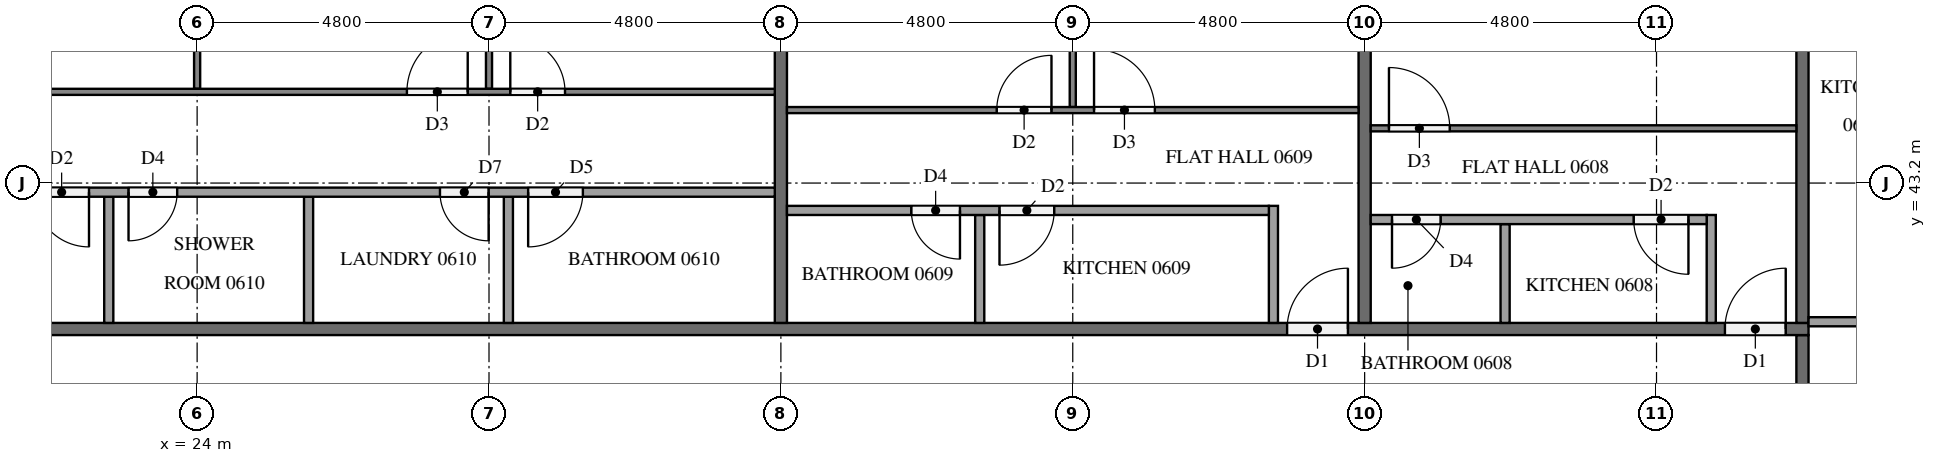
"""IFC4 building model, lengths in metres.
Left out: names, types, materials, properties, quantities, classifications, styles, units other than length and angle.
Written with IfcOpenShell. Run it as: python <this file> out.ifc"""

import sys

from ifc_helpers import new_model, si_unit, direction, frame, frame_2d, origin, place, context, subcontext, project, spatial, rectangle, extrude, element, fill, save


model = new_model("IFC4")
c1 = context("Model", 3, precision=1e-05, world=origin(), true_north=direction((0.0, 1.0)))
c2 = subcontext(c1, "Body", "Model", "MODEL_VIEW")
j1 = project(units=[si_unit("LENGTHUNIT", "METRE"), si_unit("PLANEANGLEUNIT", "RADIAN")], contexts=[c1])
p1 = place(None, origin())
s1 = spatial("IfcSite", under=j1, at=p1, CompositionType="ELEMENT")
p2 = place(p1, origin())
s2 = spatial("IfcBuilding", under=s1, at=p2, CompositionType="ELEMENT")
p3 = place(p2, frame((0.0, 0.0, 29.4)))
s3 = spatial("IfcBuildingStorey", under=s2, at=p3, CompositionType="ELEMENT", Elevation=29.4)
p4 = place(p3, frame((50.4, 40.7, 0.0), z_axis=(0.0, 0.0, 1.0), x_axis=(0.0, -1.0, 0.0)))
e1 = element("IfcWall", 1, at=p4, inside=s3, PredefinedType="PARTITIONING", context=c2, shape_type="SweptSolid", body=[
    extrude(rectangle(XDim=28.6, YDim=0.2, at=frame_2d((14.3, 0.0))), origin(), (0.0, 0.0, 1.0), 3.2),
])
p5 = place(p4, frame((27.375, 0.0, 0.0)))
e2 = element("IfcOpeningElement", 2, at=p5, cuts=e1, PredefinedType="OPENING", context=c2, shape_type="SweptSolid", body=[
    extrude(rectangle(XDim=1.1, YDim=2.1, at=frame_2d((0.55, 1.05))), frame((0.0, 0.11, 0.0), z_axis=(0.0, -1.0, 0.0), x_axis=(1.0, 0.0, 0.0)), (0.0, 0.0, 1.0), 0.22),
])
p6 = place(p4, frame((8.225, 0.0, 0.0)))
e3 = element("IfcOpeningElement", 3, at=p6, cuts=e1, PredefinedType="OPENING", context=c2, shape_type="SweptSolid", body=[
    extrude(rectangle(XDim=1.0, YDim=2.1, at=frame_2d((0.5, 1.05))), frame((0.0, 0.11, 0.0), z_axis=(0.0, -1.0, 0.0), x_axis=(1.0, 0.0, 0.0)), (0.0, 0.0, 1.0), 0.22),
])
p7 = place(p3, frame((11.9, 40.8, 0.0), z_axis=(0.0, 0.0, 1.0), x_axis=(1.0, 0.0, 0.0)))
e4 = element("IfcWall", 4, at=p7, inside=s3, PredefinedType="PARTITIONING", context=c2, shape_type="SweptSolid", body=[
    extrude(rectangle(XDim=38.6, YDim=0.2, at=frame_2d((19.3, 0.0))), origin(), (0.0, 0.0, 1.0), 3.2),
])
p8 = place(p7, frame((37.225, 0.0, 0.0)))
e5 = element("IfcOpeningElement", 5, at=p8, cuts=e4, PredefinedType="OPENING", context=c2, shape_type="SweptSolid", body=[
    extrude(rectangle(XDim=1.0, YDim=2.1, at=frame_2d((0.5, 1.05))), frame((0.0, 0.11, 0.0), z_axis=(0.0, -1.0, 0.0), x_axis=(1.0, 0.0, 0.0)), (0.0, 0.0, 1.0), 0.22),
])
p9 = place(p7, frame((30.025, 0.0, 0.0)))
e6 = element("IfcOpeningElement", 6, at=p9, cuts=e4, PredefinedType="OPENING", context=c2, shape_type="SweptSolid", body=[
    extrude(rectangle(XDim=1.0, YDim=2.1, at=frame_2d((0.5, 1.05))), frame((0.0, 0.11, 0.0), z_axis=(0.0, -1.0, 0.0), x_axis=(1.0, 0.0, 0.0)), (0.0, 0.0, 1.0), 0.22),
])
p10 = place(p7, frame((2.725, 0.0, 0.0)))
e7 = element("IfcOpeningElement", 7, at=p10, cuts=e4, PredefinedType="OPENING", context=c2, shape_type="SweptSolid", body=[
    extrude(rectangle(XDim=1.1, YDim=2.1, at=frame_2d((0.55, 1.05))), frame((0.0, 0.11, 0.0), z_axis=(0.0, -1.0, 0.0), x_axis=(1.0, 0.0, 0.0)), (0.0, 0.0, 1.0), 0.22),
])
p11 = place(p7, frame((1.225, 0.0, 0.0)))
e8 = element("IfcOpeningElement", 8, at=p11, cuts=e4, PredefinedType="OPENING", context=c2, shape_type="SweptSolid", body=[
    extrude(rectangle(XDim=1.0, YDim=2.1, at=frame_2d((0.5, 1.05))), frame((0.0, 0.11, 0.0), z_axis=(0.0, -1.0, 0.0), x_axis=(1.0, 0.0, 0.0)), (0.0, 0.0, 1.0), 0.22),
])
p12 = place(p3, frame((50.4, 40.9, 0.0), z_axis=(0.0, 0.0, 1.0), x_axis=(0.0, 1.0, 0.0)))
e9 = element("IfcWall", 9, at=p12, inside=s3, PredefinedType="PARTITIONING", context=c2, shape_type="SweptSolid", body=[
    extrude(rectangle(XDim=7.0, YDim=0.2, at=frame_2d((3.5, 0.0))), origin(), (0.0, 0.0, 1.0), 3.2),
])
for number, where, z_axis, x_axis in (
    (10, (43.2, 47.55, 0.0), (0.0, 0.0, 1.0), (0.0, -1.0, 0.0)),
    (11, (33.6, 47.55, 0.0), (0.0, 0.0, 1.0), (0.0, -1.0, 0.0)),
):
    element("IfcWall", number, at=place(p3, frame(where, z_axis=z_axis, x_axis=x_axis)), inside=s3, PredefinedType="PARTITIONING", context=c2, shape_type="SweptSolid", body=[
        extrude(rectangle(XDim=6.65, YDim=0.2, at=frame_2d((3.325, 0.0))), origin(), (0.0, 0.0, 1.0), 3.2),
    ])
p13 = place(p3, frame((50.5, 40.919, 0.0), z_axis=(0.0, 0.0, 1.0), x_axis=(1.0, 0.0, 0.0)))
e12 = element("IfcWall", 12, at=p13, inside=s3, PredefinedType="PARTITIONING", context=c2, shape_type="SweptSolid", body=[
    extrude(rectangle(XDim=1.775, YDim=0.15, at=frame_2d((0.887, 0.0))), origin(), (0.0, 0.0, 1.0), 3.2),
])
p14 = place(p3, frame((43.3, 44.1, 0.0), z_axis=(0.0, 0.0, 1.0), x_axis=(1.0, 0.0, 0.0)))
e13 = element("IfcWall", 13, at=p14, inside=s3, PredefinedType="PARTITIONING", context=c2, shape_type="SweptSolid", body=[
    extrude(rectangle(XDim=7.0, YDim=0.1, at=frame_2d((3.5, 0.0))), origin(), (0.0, 0.0, 1.0), 3.2),
])
p15 = place(p14, frame((0.3, 0.0, 0.0)))
e14 = element("IfcOpeningElement", 14, at=p15, cuts=e13, PredefinedType="OPENING", context=c2, shape_type="SweptSolid", body=[
    extrude(rectangle(XDim=1.0, YDim=2.1, at=frame_2d((0.5, 1.05))), frame((0.0, 0.06, 0.0), z_axis=(0.0, -1.0, 0.0), x_axis=(1.0, 0.0, 0.0)), (0.0, 0.0, 1.0), 0.12),
])
p16 = place(p3, frame((45.51, 40.9, 0.0), z_axis=(0.0, 0.0, 1.0), x_axis=(0.0, 1.0, 0.0)))
e15 = element("IfcWall", 15, at=p16, inside=s3, PredefinedType="PARTITIONING", context=c2, shape_type="SweptSolid", body=[
    extrude(rectangle(XDim=1.625, YDim=0.15, at=frame_2d((0.812, 0.0))), origin(), (0.0, 0.0, 1.0), 3.2),
])
p17 = place(p3, frame((48.9, 40.9, 0.0), z_axis=(0.0, 0.0, 1.0), x_axis=(0.0, 1.0, 0.0)))
e16 = element("IfcWall", 16, at=p17, inside=s3, PredefinedType="PARTITIONING", context=c2, shape_type="SweptSolid", body=[
    extrude(rectangle(XDim=1.775, YDim=0.15, at=frame_2d((0.888, 0.0))), origin(), (0.0, 0.0, 1.0), 3.2),
])
p18 = place(p3, frame((48.825, 42.6, 0.0), z_axis=(0.0, 0.0, 1.0), x_axis=(-1.0, 0.0, 0.0)))
e17 = element("IfcWall", 17, at=p18, inside=s3, PredefinedType="PARTITIONING", context=c2, shape_type="SweptSolid", body=[
    extrude(rectangle(XDim=5.525, YDim=0.15, at=frame_2d((2.762, 0.0))), origin(), (0.0, 0.0, 1.0), 3.2),
])
p19 = place(p18, frame((0.3, 0.0, 0.0)))
e18 = element("IfcOpeningElement", 18, at=p19, cuts=e17, PredefinedType="OPENING", context=c2, shape_type="SweptSolid", body=[
    extrude(rectangle(XDim=0.9, YDim=2.1, at=frame_2d((0.45, 1.05))), frame((0.0, 0.085, 0.0), z_axis=(0.0, -1.0, 0.0), x_axis=(1.0, 0.0, 0.0)), (0.0, 0.0, 1.0), 0.17),
])
p20 = place(p18, frame((4.375, 0.0, 0.0)))
e19 = element("IfcOpeningElement", 19, at=p20, cuts=e17, PredefinedType="OPENING", context=c2, shape_type="SweptSolid", body=[
    extrude(rectangle(XDim=0.8, YDim=2.1, at=frame_2d((0.4, 1.05))), frame((0.0, 0.085, 0.0), z_axis=(0.0, -1.0, 0.0), x_axis=(1.0, 0.0, 0.0)), (0.0, 0.0, 1.0), 0.17),
])
p21 = place(p3, frame((38.4, 44.45, 0.0), z_axis=(0.0, 0.0, 1.0), x_axis=(0.0, 1.0, 0.0)))
e20 = element("IfcWall", 20, at=p21, inside=s3, PredefinedType="PARTITIONING", context=c2, shape_type="SweptSolid", body=[
    extrude(rectangle(XDim=3.45, YDim=0.1, at=frame_2d((1.725, 0.0))), origin(), (0.0, 0.0, 1.0), 3.2),
])
p22 = place(p3, frame((33.7, 44.4, 0.0), z_axis=(0.0, 0.0, 1.0), x_axis=(1.0, 0.0, 0.0)))
e21 = element("IfcWall", 21, at=p22, inside=s3, PredefinedType="PARTITIONING", context=c2, shape_type="SweptSolid", body=[
    extrude(rectangle(XDim=9.4, YDim=0.1, at=frame_2d((4.7, 0.0))), origin(), (0.0, 0.0, 1.0), 3.2),
])
p23 = place(p22, frame((5.05, 0.0, 0.0)))
e22 = element("IfcOpeningElement", 22, at=p23, cuts=e21, PredefinedType="OPENING", context=c2, shape_type="SweptSolid", body=[
    extrude(rectangle(XDim=1.0, YDim=2.1, at=frame_2d((0.5, 1.05))), frame((0.0, 0.06, 0.0), z_axis=(0.0, -1.0, 0.0), x_axis=(1.0, 0.0, 0.0)), (0.0, 0.0, 1.0), 0.12),
])
p24 = place(p22, frame((3.45, 0.0, 0.0)))
e23 = element("IfcOpeningElement", 23, at=p24, cuts=e21, PredefinedType="OPENING", context=c2, shape_type="SweptSolid", body=[
    extrude(rectangle(XDim=0.9, YDim=2.1, at=frame_2d((0.45, 1.05))), frame((0.0, 0.06, 0.0), z_axis=(0.0, -1.0, 0.0), x_axis=(1.0, 0.0, 0.0)), (0.0, 0.0, 1.0), 0.12),
])
p25 = place(p3, frame((36.87, 40.9, 0.0), z_axis=(0.0, 0.0, 1.0), x_axis=(0.0, 1.0, 0.0)))
e24 = element("IfcWall", 24, at=p25, inside=s3, PredefinedType="PARTITIONING", context=c2, shape_type="SweptSolid", body=[
    extrude(rectangle(XDim=1.775, YDim=0.15, at=frame_2d((0.888, 0.0))), origin(), (0.0, 0.0, 1.0), 3.2),
])
p26 = place(p3, frame((41.7, 40.9, 0.0), z_axis=(0.0, 0.0, 1.0), x_axis=(0.0, 1.0, 0.0)))
e25 = element("IfcWall", 25, at=p26, inside=s3, PredefinedType="PARTITIONING", context=c2, shape_type="SweptSolid", body=[
    extrude(rectangle(XDim=1.925, YDim=0.15, at=frame_2d((0.962, 0.0))), origin(), (0.0, 0.0, 1.0), 3.2),
])
p27 = place(p3, frame((41.625, 42.75, 0.0), z_axis=(0.0, 0.0, 1.0), x_axis=(-1.0, 0.0, 0.0)))
e26 = element("IfcWall", 26, at=p27, inside=s3, PredefinedType="PARTITIONING", context=c2, shape_type="SweptSolid", body=[
    extrude(rectangle(XDim=7.925, YDim=0.15, at=frame_2d((3.962, 0.0))), origin(), (0.0, 0.0, 1.0), 3.2),
])
p28 = place(p27, frame((3.53, 0.0, 0.0)))
e27 = element("IfcOpeningElement", 27, at=p28, cuts=e26, PredefinedType="OPENING", context=c2, shape_type="SweptSolid", body=[
    extrude(rectangle(XDim=0.9, YDim=2.1, at=frame_2d((0.45, 1.05))), frame((0.0, 0.085, 0.0), z_axis=(0.0, -1.0, 0.0), x_axis=(1.0, 0.0, 0.0)), (0.0, 0.0, 1.0), 0.17),
])
p29 = place(p27, frame((5.08, 0.0, 0.0)))
e28 = element("IfcOpeningElement", 28, at=p29, cuts=e26, PredefinedType="OPENING", context=c2, shape_type="SweptSolid", body=[
    extrude(rectangle(XDim=0.8, YDim=2.1, at=frame_2d((0.4, 1.05))), frame((0.0, 0.085, 0.0), z_axis=(0.0, -1.0, 0.0), x_axis=(1.0, 0.0, 0.0)), (0.0, 0.0, 1.0), 0.17),
])
p30 = place(p3, frame((24.0, 44.75, 0.0), z_axis=(0.0, 0.0, 1.0), x_axis=(0.0, 1.0, 0.0)))
e29 = element("IfcWall", 29, at=p30, inside=s3, PredefinedType="PARTITIONING", context=c2, shape_type="SweptSolid", body=[
    extrude(rectangle(XDim=2.8, YDim=0.1, at=frame_2d((1.4, 0.0))), origin(), (0.0, 0.0, 1.0), 3.2),
])
p31 = place(p3, frame((28.8, 44.75, 0.0), z_axis=(0.0, 0.0, 1.0), x_axis=(0.0, 1.0, 0.0)))
e30 = element("IfcWall", 30, at=p31, inside=s3, PredefinedType="PARTITIONING", context=c2, shape_type="SweptSolid", body=[
    extrude(rectangle(XDim=3.15, YDim=0.1, at=frame_2d((1.575, 0.0))), origin(), (0.0, 0.0, 1.0), 3.2),
])
p32 = place(p3, frame((14.5, 44.7, 0.0), z_axis=(0.0, 0.0, 1.0), x_axis=(1.0, 0.0, 0.0)))
e31 = element("IfcWall", 31, at=p32, inside=s3, PredefinedType="PARTITIONING", context=c2, shape_type="SweptSolid", body=[
    extrude(rectangle(XDim=19.0, YDim=0.1, at=frame_2d((9.5, 0.0))), origin(), (0.0, 0.0, 1.0), 3.2),
])
p33 = place(p32, frame((3.45, 0.0, 0.0)))
e32 = element("IfcOpeningElement", 32, at=p33, cuts=e31, PredefinedType="OPENING", context=c2, shape_type="SweptSolid", body=[
    extrude(rectangle(XDim=0.9, YDim=2.1, at=frame_2d((0.45, 1.05))), frame((0.0, 0.06, 0.0), z_axis=(0.0, -1.0, 0.0), x_axis=(1.0, 0.0, 0.0)), (0.0, 0.0, 1.0), 0.12),
])
p34 = place(p32, frame((5.05, 0.0, 0.0)))
e33 = element("IfcOpeningElement", 33, at=p34, cuts=e31, PredefinedType="OPENING", context=c2, shape_type="SweptSolid", body=[
    extrude(rectangle(XDim=0.9, YDim=2.1, at=frame_2d((0.45, 1.05))), frame((0.0, 0.06, 0.0), z_axis=(0.0, -1.0, 0.0), x_axis=(1.0, 0.0, 0.0)), (0.0, 0.0, 1.0), 0.12),
])
p35 = place(p32, frame((12.95, 0.0, 0.0)))
e34 = element("IfcOpeningElement", 34, at=p35, cuts=e31, PredefinedType="OPENING", context=c2, shape_type="SweptSolid", body=[
    extrude(rectangle(XDim=1.0, YDim=2.1, at=frame_2d((0.5, 1.05))), frame((0.0, 0.06, 0.0), z_axis=(0.0, -1.0, 0.0), x_axis=(1.0, 0.0, 0.0)), (0.0, 0.0, 1.0), 0.12),
])
p36 = place(p32, frame((14.65, 0.0, 0.0)))
e35 = element("IfcOpeningElement", 35, at=p36, cuts=e31, PredefinedType="OPENING", context=c2, shape_type="SweptSolid", body=[
    extrude(rectangle(XDim=0.9, YDim=2.1, at=frame_2d((0.45, 1.05))), frame((0.0, 0.06, 0.0), z_axis=(0.0, -1.0, 0.0), x_axis=(1.0, 0.0, 0.0)), (0.0, 0.0, 1.0), 0.12),
])
for number, where, z_axis, x_axis in (
    (36, (22.547, 40.9, 0.0), (0.0, 0.0, 1.0), (0.0, 1.0, 0.0)),
    (37, (25.833, 40.9, 0.0), (0.0, 0.0, 1.0), (0.0, 1.0, 0.0)),
    (38, (29.119, 40.9, 0.0), (0.0, 0.0, 1.0), (0.0, 1.0, 0.0)),
):
    element("IfcWall", number, at=place(p3, frame(where, z_axis=z_axis, x_axis=x_axis)), inside=s3, PredefinedType="PARTITIONING", context=c2, shape_type="SweptSolid", body=[
        extrude(rectangle(XDim=2.075, YDim=0.15, at=frame_2d((1.038, 0.0))), origin(), (0.0, 0.0, 1.0), 3.2),
    ])
p37 = place(p3, frame((33.5, 43.05, 0.0), z_axis=(0.0, 0.0, 1.0), x_axis=(-1.0, 0.0, 0.0)))
e39 = element("IfcWall", 39, at=p37, inside=s3, PredefinedType="PARTITIONING", context=c2, shape_type="SweptSolid", body=[
    extrude(rectangle(XDim=17.525, YDim=0.15, at=frame_2d((8.762, 0.0))), origin(), (0.0, 0.0, 1.0), 3.2),
])
p38 = place(p37, frame((11.278, 0.0, 0.0)))
e40 = element("IfcOpeningElement", 40, at=p38, cuts=e39, PredefinedType="OPENING", context=c2, shape_type="SweptSolid", body=[
    extrude(rectangle(XDim=0.9, YDim=2.1, at=frame_2d((0.45, 1.05))), frame((0.0, 0.085, 0.0), z_axis=(0.0, -1.0, 0.0), x_axis=(1.0, 0.0, 0.0)), (0.0, 0.0, 1.0), 0.17),
])
p39 = place(p37, frame((9.828, 0.0, 0.0)))
e41 = element("IfcOpeningElement", 41, at=p39, cuts=e39, PredefinedType="OPENING", context=c2, shape_type="SweptSolid", body=[
    extrude(rectangle(XDim=0.8, YDim=2.1, at=frame_2d((0.4, 1.05))), frame((0.0, 0.085, 0.0), z_axis=(0.0, -1.0, 0.0), x_axis=(1.0, 0.0, 0.0)), (0.0, 0.0, 1.0), 0.17),
])
p40 = place(p37, frame((4.706, 0.0, 0.0)))
e42 = element("IfcOpeningElement", 42, at=p40, cuts=e39, PredefinedType="OPENING", context=c2, shape_type="SweptSolid", body=[
    extrude(rectangle(XDim=0.8, YDim=2.1, at=frame_2d((0.4, 1.05))), frame((0.0, 0.085, 0.0), z_axis=(0.0, -1.0, 0.0), x_axis=(1.0, 0.0, 0.0)), (0.0, 0.0, 1.0), 0.17),
])
p41 = place(p37, frame((3.156, 0.0, 0.0)))
e43 = element("IfcOpeningElement", 43, at=p41, cuts=e39, PredefinedType="OPENING", context=c2, shape_type="SweptSolid", body=[
    extrude(rectangle(XDim=0.9, YDim=2.1, at=frame_2d((0.45, 1.05))), frame((0.0, 0.085, 0.0), z_axis=(0.0, -1.0, 0.0), x_axis=(1.0, 0.0, 0.0)), (0.0, 0.0, 1.0), 0.17),
])
p42 = place(p8, origin())
e44 = element("IfcDoor", 44, at=p42, inside=s3, OperationType="SINGLE_SWING_RIGHT", PredefinedType="DOOR", context=c2, shape_type="SweptSolid", body=[
    extrude(rectangle(XDim=1.0, YDim=2.1, at=frame_2d((0.5, 1.05))), frame((0.0, 0.025, 0.0), z_axis=(0.0, -1.0, 0.0), x_axis=(1.0, 0.0, 0.0)), (0.0, 0.0, 1.0), 0.05),
])
fill(e5, e44)
p43 = place(p9, origin())
e45 = element("IfcDoor", 45, at=p43, inside=s3, OperationType="SINGLE_SWING_RIGHT", PredefinedType="DOOR", context=c2, shape_type="SweptSolid", body=[
    extrude(rectangle(XDim=1.0, YDim=2.1, at=frame_2d((0.5, 1.05))), frame((0.0, 0.025, 0.0), z_axis=(0.0, -1.0, 0.0), x_axis=(1.0, 0.0, 0.0)), (0.0, 0.0, 1.0), 0.05),
])
fill(e6, e45)
p44 = place(p15, origin())
e46 = element("IfcDoor", 46, at=p44, inside=s3, OperationType="SINGLE_SWING_LEFT", PredefinedType="DOOR", context=c2, shape_type="SweptSolid", body=[
    extrude(rectangle(XDim=1.0, YDim=2.1, at=frame_2d((0.5, 1.05))), frame((0.0, 0.025, 0.0), z_axis=(0.0, -1.0, 0.0), x_axis=(1.0, 0.0, 0.0)), (0.0, 0.0, 1.0), 0.05),
])
fill(e14, e46)
p45 = place(p19, origin())
e47 = element("IfcDoor", 47, at=p45, inside=s3, OperationType="SINGLE_SWING_LEFT", PredefinedType="DOOR", context=c2, shape_type="SweptSolid", body=[
    extrude(rectangle(XDim=0.9, YDim=2.1, at=frame_2d((0.45, 1.05))), frame((0.0, 0.025, 0.0), z_axis=(0.0, -1.0, 0.0), x_axis=(1.0, 0.0, 0.0)), (0.0, 0.0, 1.0), 0.05),
])
fill(e18, e47)
p46 = place(p20, origin())
e48 = element("IfcDoor", 48, at=p46, inside=s3, OperationType="SINGLE_SWING_RIGHT", PredefinedType="DOOR", context=c2, shape_type="SweptSolid", body=[
    extrude(rectangle(XDim=0.8, YDim=2.1, at=frame_2d((0.4, 1.05))), frame((0.0, 0.025, 0.0), z_axis=(0.0, -1.0, 0.0), x_axis=(1.0, 0.0, 0.0)), (0.0, 0.0, 1.0), 0.05),
])
fill(e19, e48)
p47 = place(p23, origin())
e49 = element("IfcDoor", 49, at=p47, inside=s3, OperationType="SINGLE_SWING_LEFT", PredefinedType="DOOR", context=c2, shape_type="SweptSolid", body=[
    extrude(rectangle(XDim=1.0, YDim=2.1, at=frame_2d((0.5, 1.05))), frame((0.0, 0.025, 0.0), z_axis=(0.0, -1.0, 0.0), x_axis=(1.0, 0.0, 0.0)), (0.0, 0.0, 1.0), 0.05),
])
fill(e22, e49)
p48 = place(p24, origin())
e50 = element("IfcDoor", 50, at=p48, inside=s3, OperationType="SINGLE_SWING_RIGHT", PredefinedType="DOOR", context=c2, shape_type="SweptSolid", body=[
    extrude(rectangle(XDim=0.9, YDim=2.1, at=frame_2d((0.45, 1.05))), frame((0.0, 0.025, 0.0), z_axis=(0.0, -1.0, 0.0), x_axis=(1.0, 0.0, 0.0)), (0.0, 0.0, 1.0), 0.05),
])
fill(e23, e50)
p49 = place(p28, origin())
e51 = element("IfcDoor", 51, at=p49, inside=s3, OperationType="SINGLE_SWING_RIGHT", PredefinedType="DOOR", context=c2, shape_type="SweptSolid", body=[
    extrude(rectangle(XDim=0.9, YDim=2.1, at=frame_2d((0.45, 1.05))), frame((0.0, 0.025, 0.0), z_axis=(0.0, -1.0, 0.0), x_axis=(1.0, 0.0, 0.0)), (0.0, 0.0, 1.0), 0.05),
])
fill(e27, e51)
p50 = place(p29, origin())
e52 = element("IfcDoor", 52, at=p50, inside=s3, OperationType="SINGLE_SWING_LEFT", PredefinedType="DOOR", context=c2, shape_type="SweptSolid", body=[
    extrude(rectangle(XDim=0.8, YDim=2.1, at=frame_2d((0.4, 1.05))), frame((0.0, 0.025, 0.0), z_axis=(0.0, -1.0, 0.0), x_axis=(1.0, 0.0, 0.0)), (0.0, 0.0, 1.0), 0.05),
])
fill(e28, e52)
p51 = place(p35, origin())
e53 = element("IfcDoor", 53, at=p51, inside=s3, OperationType="SINGLE_SWING_RIGHT", PredefinedType="DOOR", context=c2, shape_type="SweptSolid", body=[
    extrude(rectangle(XDim=1.0, YDim=2.1, at=frame_2d((0.5, 1.05))), frame((0.0, 0.025, 0.0), z_axis=(0.0, -1.0, 0.0), x_axis=(1.0, 0.0, 0.0)), (0.0, 0.0, 1.0), 0.05),
])
fill(e34, e53)
p52 = place(p36, origin())
e54 = element("IfcDoor", 54, at=p52, inside=s3, OperationType="SINGLE_SWING_LEFT", PredefinedType="DOOR", context=c2, shape_type="SweptSolid", body=[
    extrude(rectangle(XDim=0.9, YDim=2.1, at=frame_2d((0.45, 1.05))), frame((0.0, 0.025, 0.0), z_axis=(0.0, -1.0, 0.0), x_axis=(1.0, 0.0, 0.0)), (0.0, 0.0, 1.0), 0.05),
])
fill(e35, e54)
p53 = place(p38, origin())
e55 = element("IfcDoor", 55, at=p53, inside=s3, OperationType="SINGLE_SWING_LEFT", PredefinedType="DOOR", context=c2, shape_type="SweptSolid", body=[
    extrude(rectangle(XDim=0.9, YDim=2.1, at=frame_2d((0.45, 1.05))), frame((0.0, 0.025, 0.0), z_axis=(0.0, -1.0, 0.0), x_axis=(1.0, 0.0, 0.0)), (0.0, 0.0, 1.0), 0.05),
])
fill(e40, e55)
p54 = place(p39, origin())
e56 = element("IfcDoor", 56, at=p54, inside=s3, OperationType="SINGLE_SWING_RIGHT", PredefinedType="DOOR", context=c2, shape_type="SweptSolid", body=[
    extrude(rectangle(XDim=0.8, YDim=2.1, at=frame_2d((0.4, 1.05))), frame((0.0, 0.025, 0.0), z_axis=(0.0, -1.0, 0.0), x_axis=(1.0, 0.0, 0.0)), (0.0, 0.0, 1.0), 0.05),
])
fill(e41, e56)
p55 = place(p40, origin())
e57 = element("IfcDoor", 57, at=p55, inside=s3, OperationType="SINGLE_SWING_LEFT", PredefinedType="DOOR", context=c2, shape_type="SweptSolid", body=[
    extrude(rectangle(XDim=0.8, YDim=2.1, at=frame_2d((0.4, 1.05))), frame((0.0, 0.025, 0.0), z_axis=(0.0, -1.0, 0.0), x_axis=(1.0, 0.0, 0.0)), (0.0, 0.0, 1.0), 0.05),
])
fill(e42, e57)
p56 = place(p41, origin())
e58 = element("IfcDoor", 58, at=p56, inside=s3, OperationType="SINGLE_SWING_RIGHT", PredefinedType="DOOR", context=c2, shape_type="SweptSolid", body=[
    extrude(rectangle(XDim=0.9, YDim=2.1, at=frame_2d((0.45, 1.05))), frame((0.0, 0.025, 0.0), z_axis=(0.0, -1.0, 0.0), x_axis=(1.0, 0.0, 0.0)), (0.0, 0.0, 1.0), 0.05),
])
fill(e43, e58)
save(model, sys.argv[1])
